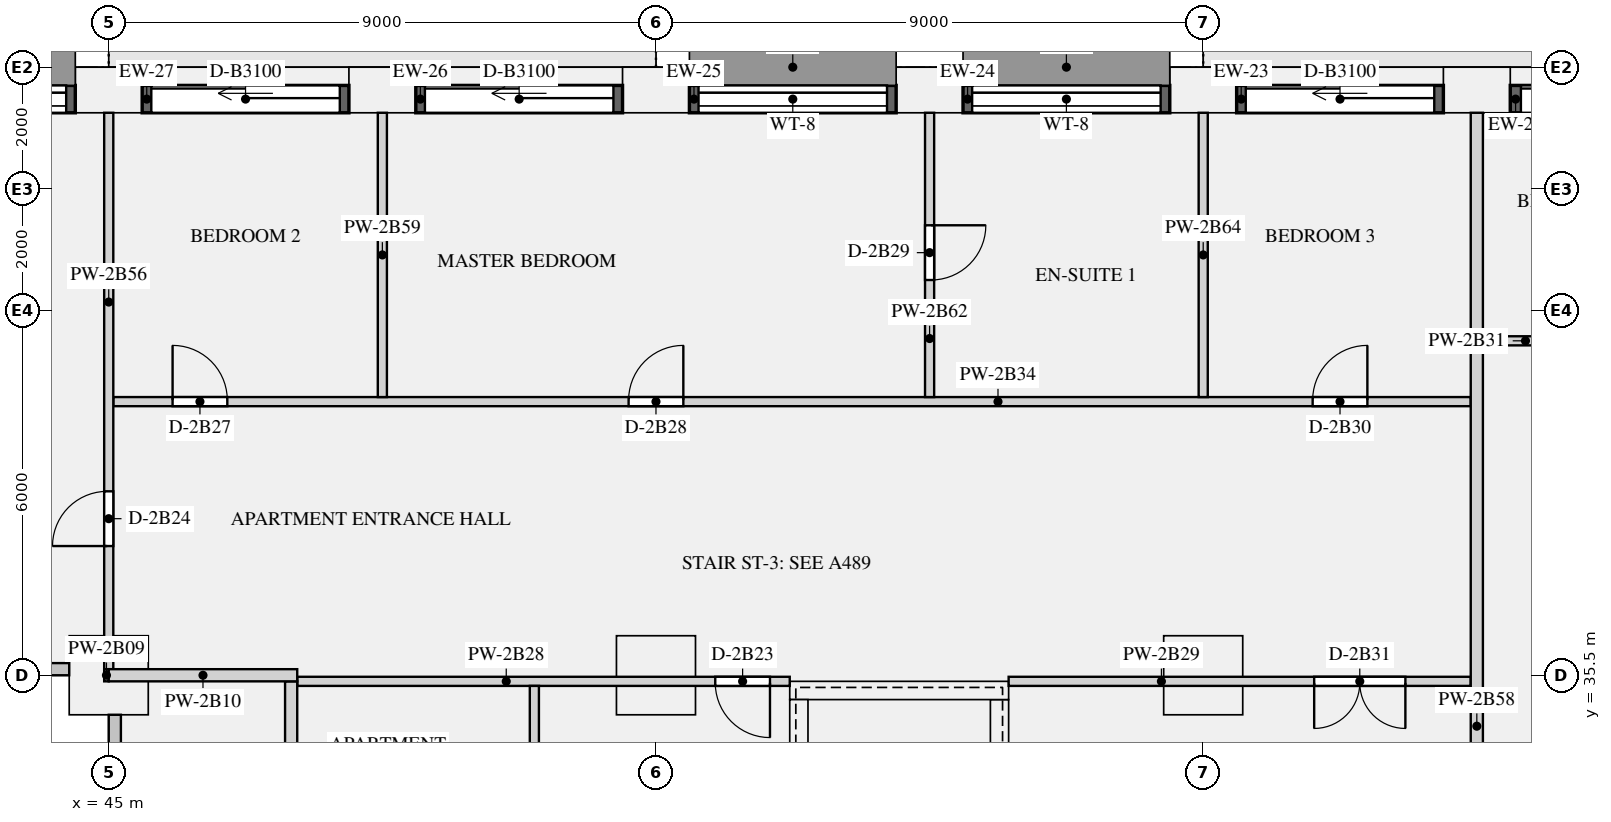
"""IFC4 building model, lengths in metres.
Left out: names, types, materials, properties, quantities, classifications, styles, units other than length and angle.
Written with IfcOpenShell. Run it as: python <this file> out.ifc"""

import sys

from ifc_helpers import new_model, si_unit, direction, frame, frame_2d, origin, origin_2d, place, context, subcontext, project, spatial, rectangle, extrude, element, fill, save


model = new_model("IFC4")
c1 = context("Model", 3, precision=1e-05, world=origin(), true_north=direction((0.0, 1.0)))
c2 = subcontext(c1, "Body", "Model", "MODEL_VIEW")
j1 = project(units=[si_unit("LENGTHUNIT", "METRE"), si_unit("PLANEANGLEUNIT", "RADIAN")], contexts=[c1])
p1 = place(None, origin())
s1 = spatial("IfcSite", under=j1, at=p1, CompositionType="ELEMENT")
p2 = place(p1, origin())
s2 = spatial("IfcBuilding", under=s1, at=p2, CompositionType="ELEMENT")
p3 = place(p2, frame((0.0, 0.0, 93.0)))
s3 = spatial("IfcBuildingStorey", under=s2, at=p3, CompositionType="ELEMENT", Elevation=93.0)
for number, where, z_axis, x_axis in (
    (1, (67.5, 45.125, 0.0), (0.0, 0.0, 1.0), (-1.0, 0.0, 0.0)),
    (2, (63.0, 45.125, 0.0), (0.0, 0.0, 1.0), (-1.0, 0.0, 0.0)),
    (3, (58.5, 45.125, 0.0), (0.0, 0.0, 1.0), (-1.0, 0.0, 0.0)),
    (4, (54.0, 45.125, 0.0), (0.0, 0.0, 1.0), (-1.0, 0.0, 0.0)),
    (5, (49.5, 45.125, 0.0), (0.0, 0.0, 1.0), (-1.0, 0.0, 0.0)),
    (6, (45.0, 45.125, 0.0), (0.0, 0.0, 1.0), (-1.0, 0.0, 0.0)),
):
    element("IfcColumn", number, at=place(p3, frame(where, z_axis=z_axis, x_axis=x_axis)), inside=s3, PredefinedType="USERDEFINED", context=c2, shape_type="SweptSolid", body=[
        extrude(rectangle(XDim=1.1, YDim=0.75, at=origin_2d()), origin(), (0.0, 0.0, 1.0), 3.15),
    ])
for number, where, z_axis, x_axis in (
    (7, (45.0, 35.5, 0.0), (0.0, 0.0, 1.0), (1.0, 0.0, 0.0)),
    (8, (54.0, 35.5, 0.0), (0.0, 0.0, 1.0), (1.0, 0.0, 0.0)),
    (9, (63.0, 35.5, 0.0), (0.0, 0.0, 1.0), (1.0, 0.0, 0.0)),
):
    element("IfcColumn", number, at=place(p3, frame(where, z_axis=z_axis, x_axis=x_axis)), inside=s3, PredefinedType="COLUMN", context=c2, shape_type="SweptSolid", body=[
        extrude(rectangle(XDim=1.3, YDim=1.3, at=origin_2d()), origin(), (0.0, 0.0, 1.0), 3.15),
    ])
p4 = place(p3, frame((56.2, 35.25, 0.0), z_axis=(0.0, 0.0, 1.0), x_axis=(1.0, 0.0, 0.0)))
e10 = element("IfcWall", 10, at=p4, inside=s3, PredefinedType="SHEAR", context=c2, shape_type="SweptSolid", body=[
    extrude(rectangle(XDim=3.6, YDim=0.3, at=frame_2d((1.8, 0.0))), origin(), (0.0, 0.0, 1.0), 3.15),
])
for number, where, z_axis, x_axis in (
    (11, (56.35, 27.3, 0.0), (0.0, 0.0, 1.0), (0.0, 1.0, 0.0)),
    (12, (59.65, 27.3, 0.0), (0.0, 0.0, 1.0), (0.0, 1.0, 0.0)),
):
    element("IfcWall", number, at=place(p3, frame(where, z_axis=z_axis, x_axis=x_axis)), inside=s3, PredefinedType="SHEAR", context=c2, shape_type="SweptSolid", body=[
        extrude(rectangle(XDim=7.8, YDim=0.3, at=frame_2d((3.9, 0.0))), origin(), (0.0, 0.0, 1.0), 3.15),
    ])
p5 = place(p3, frame((70.9, 44.975, 0.0), z_axis=(0.0, 0.0, 1.0), x_axis=(-1.0, 0.0, 0.0)))
e13 = element("IfcWall", 13, at=p5, inside=s3, PredefinedType="SOLIDWALL", context=c2, shape_type="SweptSolid", body=[
    extrude(rectangle(XDim=2.85, YDim=0.45, at=frame_2d((1.425, 0.0))), origin(), (0.0, 0.0, 1.0), 2.83),
])
p6 = place(p5, frame((0.175, 0.0, 0.0)))
e14 = element("IfcOpeningElement", 14, at=p6, cuts=e13, PredefinedType="OPENING", context=c2, shape_type="SweptSolid", body=[
    extrude(rectangle(XDim=2.5, YDim=2.3, at=frame_2d((1.25, 1.15))), frame((0.0, 0.235, 0.0), z_axis=(0.0, -1.0, 0.0), x_axis=(1.0, 0.0, 0.0)), (0.0, 0.0, 1.0), 0.47),
])
p7 = place(p3, frame((66.95, 44.975, 0.0), z_axis=(0.0, 0.0, 1.0), x_axis=(-1.0, 0.0, 0.0)))
e15 = element("IfcWall", 15, at=p7, inside=s3, PredefinedType="SOLIDWALL", context=c2, shape_type="SweptSolid", body=[
    extrude(rectangle(XDim=3.4, YDim=0.45, at=frame_2d((1.7, 0.0))), origin(), (0.0, 0.0, 1.0), 2.83),
])
p8 = place(p7, frame((0.15, 0.0, 0.0)))
e16 = element("IfcOpeningElement", 16, at=p8, cuts=e15, PredefinedType="OPENING", context=c2, shape_type="SweptSolid", body=[
    extrude(rectangle(XDim=3.1, YDim=2.3, at=frame_2d((1.55, 1.15))), frame((0.0, 0.235, 0.0), z_axis=(0.0, -1.0, 0.0), x_axis=(1.0, 0.0, 0.0)), (0.0, 0.0, 1.0), 0.47),
])
p9 = place(p3, frame((62.45, 44.975, 0.9), z_axis=(0.0, 0.0, 1.0), x_axis=(-1.0, 0.0, 0.0)))
e17 = element("IfcWall", 17, at=p9, inside=s3, PredefinedType="SOLIDWALL", context=c2, shape_type="SweptSolid", body=[
    extrude(rectangle(XDim=3.4, YDim=0.45, at=frame_2d((1.7, 0.0))), origin(), (0.0, 0.0, 1.0), 1.93),
])
p10 = place(p9, frame((0.15, 0.0, 0.15)))
e18 = element("IfcOpeningElement", 18, at=p10, cuts=e17, PredefinedType="OPENING", context=c2, shape_type="SweptSolid", body=[
    extrude(rectangle(XDim=3.1, YDim=1.5, at=frame_2d((1.55, 0.75))), frame((0.0, 0.235, 0.0), z_axis=(0.0, -1.0, 0.0), x_axis=(1.0, 0.0, 0.0)), (0.0, 0.0, 1.0), 0.47),
])
p11 = place(p3, frame((57.95, 44.975, 0.9), z_axis=(0.0, 0.0, 1.0), x_axis=(-1.0, 0.0, 0.0)))
e19 = element("IfcWall", 19, at=p11, inside=s3, PredefinedType="SOLIDWALL", context=c2, shape_type="SweptSolid", body=[
    extrude(rectangle(XDim=3.4, YDim=0.45, at=frame_2d((1.7, 0.0))), origin(), (0.0, 0.0, 1.0), 1.93),
])
p12 = place(p11, frame((0.15, 0.0, 0.15)))
e20 = element("IfcOpeningElement", 20, at=p12, cuts=e19, PredefinedType="OPENING", context=c2, shape_type="SweptSolid", body=[
    extrude(rectangle(XDim=3.1, YDim=1.5, at=frame_2d((1.55, 0.75))), frame((0.0, 0.235, 0.0), z_axis=(0.0, -1.0, 0.0), x_axis=(1.0, 0.0, 0.0)), (0.0, 0.0, 1.0), 0.47),
])
p13 = place(p3, frame((53.45, 44.975, 0.0), z_axis=(0.0, 0.0, 1.0), x_axis=(-1.0, 0.0, 0.0)))
e21 = element("IfcWall", 21, at=p13, inside=s3, PredefinedType="SOLIDWALL", context=c2, shape_type="SweptSolid", body=[
    extrude(rectangle(XDim=3.4, YDim=0.45, at=frame_2d((1.7, 0.0))), origin(), (0.0, 0.0, 1.0), 2.83),
])
p14 = place(p13, frame((0.15, 0.0, 0.0)))
e22 = element("IfcOpeningElement", 22, at=p14, cuts=e21, PredefinedType="OPENING", context=c2, shape_type="SweptSolid", body=[
    extrude(rectangle(XDim=3.1, YDim=2.3, at=frame_2d((1.55, 1.15))), frame((0.0, 0.235, 0.0), z_axis=(0.0, -1.0, 0.0), x_axis=(1.0, 0.0, 0.0)), (0.0, 0.0, 1.0), 0.47),
])
p15 = place(p3, frame((48.95, 44.975, 0.0), z_axis=(0.0, 0.0, 1.0), x_axis=(-1.0, 0.0, 0.0)))
e23 = element("IfcWall", 23, at=p15, inside=s3, PredefinedType="SOLIDWALL", context=c2, shape_type="SweptSolid", body=[
    extrude(rectangle(XDim=3.4, YDim=0.45, at=frame_2d((1.7, 0.0))), origin(), (0.0, 0.0, 1.0), 2.83),
])
p16 = place(p15, frame((0.15, 0.0, 0.0)))
e24 = element("IfcOpeningElement", 24, at=p16, cuts=e23, PredefinedType="OPENING", context=c2, shape_type="SweptSolid", body=[
    extrude(rectangle(XDim=3.1, YDim=2.3, at=frame_2d((1.55, 1.15))), frame((0.0, 0.235, 0.0), z_axis=(0.0, -1.0, 0.0), x_axis=(1.0, 0.0, 0.0)), (0.0, 0.0, 1.0), 0.47),
])
p17 = place(p3, frame((44.45, 44.975, 0.9), z_axis=(0.0, 0.0, 1.0), x_axis=(-1.0, 0.0, 0.0)))
e25 = element("IfcWall", 25, at=p17, inside=s3, PredefinedType="SOLIDWALL", context=c2, shape_type="SweptSolid", body=[
    extrude(rectangle(XDim=3.4, YDim=0.45, at=frame_2d((1.7, 0.0))), origin(), (0.0, 0.0, 1.0), 1.93),
])
p18 = place(p17, frame((0.15, 0.0, 0.15)))
e26 = element("IfcOpeningElement", 26, at=p18, cuts=e25, PredefinedType="OPENING", context=c2, shape_type="SweptSolid", body=[
    extrude(rectangle(XDim=3.1, YDim=1.5, at=frame_2d((1.55, 0.75))), frame((0.0, 0.235, 0.0), z_axis=(0.0, -1.0, 0.0), x_axis=(1.0, 0.0, 0.0)), (0.0, 0.0, 1.0), 0.47),
])
p19 = place(p3, frame((44.925, 35.5, 0.0), z_axis=(0.0, 0.0, 1.0), x_axis=(1.0, 0.0, 0.0)))
e27 = element("IfcWall", 27, at=p19, inside=s3, PredefinedType="PARTITIONING", context=c2, shape_type="SweptSolid", body=[
    extrude(rectangle(XDim=0.075, YDim=0.2, at=frame_2d((0.038, 0.0))), origin(), (0.0, 0.0, 1.0), 2.83),
])
p20 = place(p3, frame((45.0, 35.5, 0.0), z_axis=(0.0, 0.0, 1.0), x_axis=(1.0, 0.0, 0.0)))
e28 = element("IfcWall", 28, at=p20, inside=s3, PredefinedType="PARTITIONING", context=c2, shape_type="SweptSolid", body=[
    extrude(rectangle(XDim=3.1, YDim=0.2, at=frame_2d((1.55, 0.0))), origin(), (0.0, 0.0, 1.0), 2.83),
])
p21 = place(p3, frame((48.1, 35.4, 0.0), z_axis=(0.0, 0.0, 1.0), x_axis=(1.0, 0.0, 0.0)))
e29 = element("IfcWall", 29, at=p21, inside=s3, PredefinedType="PARTITIONING", context=c2, shape_type="SweptSolid", body=[
    extrude(rectangle(XDim=8.1, YDim=0.15, at=frame_2d((4.05, 0.0))), origin(), (0.0, 0.0, 1.0), 2.83),
])
p22 = place(p21, frame((6.875, 0.0, 0.0)))
e30 = element("IfcOpeningElement", 30, at=p22, cuts=e29, PredefinedType="OPENING", context=c2, shape_type="SweptSolid", body=[
    extrude(rectangle(XDim=0.9, YDim=2.1, at=frame_2d((0.45, 1.05))), frame((0.0, 0.085, 0.0), z_axis=(0.0, -1.0, 0.0), x_axis=(1.0, 0.0, 0.0)), (0.0, 0.0, 1.0), 0.17),
])
p23 = place(p3, frame((59.8, 35.4, 0.0), z_axis=(0.0, 0.0, 1.0), x_axis=(1.0, 0.0, 0.0)))
e31 = element("IfcWall", 31, at=p23, inside=s3, PredefinedType="PARTITIONING", context=c2, shape_type="SweptSolid", body=[
    extrude(rectangle(XDim=7.6, YDim=0.15, at=frame_2d((3.8, 0.0))), origin(), (0.0, 0.0, 1.0), 2.83),
])
p24 = place(p23, frame((5.025, 0.0, 0.0)))
e32 = element("IfcOpeningElement", 32, at=p24, cuts=e31, PredefinedType="OPENING", context=c2, shape_type="SweptSolid", body=[
    extrude(rectangle(XDim=1.5, YDim=2.1, at=frame_2d((0.75, 1.05))), frame((0.0, 0.085, 0.0), z_axis=(0.0, -1.0, 0.0), x_axis=(1.0, 0.0, 0.0)), (0.0, 0.0, 1.0), 0.17),
])
p25 = place(p3, frame((67.6, 41.0, 0.0), z_axis=(0.0, 0.0, 1.0), x_axis=(1.0, 0.0, 0.0)))
e33 = element("IfcWall", 33, at=p25, inside=s3, PredefinedType="PARTITIONING", context=c2, shape_type="SweptSolid", body=[
    extrude(rectangle(XDim=3.65, YDim=0.15, at=frame_2d((1.825, 0.0))), origin(), (0.0, 0.0, 1.0), 2.83),
])
p26 = place(p25, frame((1.4, 0.0, 0.0)))
e34 = element("IfcOpeningElement", 34, at=p26, cuts=e33, PredefinedType="OPENING", context=c2, shape_type="SweptSolid", body=[
    extrude(rectangle(XDim=0.9, YDim=2.1, at=frame_2d((0.45, 1.05))), frame((0.0, 0.085, 0.0), z_axis=(0.0, -1.0, 0.0), x_axis=(1.0, 0.0, 0.0)), (0.0, 0.0, 1.0), 0.17),
])
p27 = place(p3, frame((45.075, 40.0, 0.0), z_axis=(0.0, 0.0, 1.0), x_axis=(1.0, 0.0, 0.0)))
e35 = element("IfcWall", 35, at=p27, inside=s3, PredefinedType="PARTITIONING", context=c2, shape_type="SweptSolid", body=[
    extrude(rectangle(XDim=22.325, YDim=0.15, at=frame_2d((11.163, 0.0))), origin(), (0.0, 0.0, 1.0), 2.83),
])
p28 = place(p27, frame((0.975, 0.0, 0.0)))
e36 = element("IfcOpeningElement", 36, at=p28, cuts=e35, PredefinedType="OPENING", context=c2, shape_type="SweptSolid", body=[
    extrude(rectangle(XDim=0.9, YDim=2.1, at=frame_2d((0.45, 1.05))), frame((0.0, 0.085, 0.0), z_axis=(0.0, -1.0, 0.0), x_axis=(1.0, 0.0, 0.0)), (0.0, 0.0, 1.0), 0.17),
])
p29 = place(p27, frame((8.475, 0.0, 0.0)))
e37 = element("IfcOpeningElement", 37, at=p29, cuts=e35, PredefinedType="OPENING", context=c2, shape_type="SweptSolid", body=[
    extrude(rectangle(XDim=0.9, YDim=2.1, at=frame_2d((0.45, 1.05))), frame((0.0, 0.085, 0.0), z_axis=(0.0, -1.0, 0.0), x_axis=(1.0, 0.0, 0.0)), (0.0, 0.0, 1.0), 0.17),
])
p30 = place(p27, frame((19.725, 0.0, 0.0)))
e38 = element("IfcOpeningElement", 38, at=p30, cuts=e35, PredefinedType="OPENING", context=c2, shape_type="SweptSolid", body=[
    extrude(rectangle(XDim=0.9, YDim=2.1, at=frame_2d((0.45, 1.05))), frame((0.0, 0.085, 0.0), z_axis=(0.0, -1.0, 0.0), x_axis=(1.0, 0.0, 0.0)), (0.0, 0.0, 1.0), 0.17),
])
p31 = place(p3, frame((48.0, 27.1, 0.0), z_axis=(0.0, 0.0, 1.0), x_axis=(0.0, 1.0, 0.0)))
e39 = element("IfcWall", 39, at=p31, inside=s3, PredefinedType="PARTITIONING", context=c2, shape_type="SweptSolid", body=[
    extrude(rectangle(XDim=8.3, YDim=0.2, at=frame_2d((4.15, 0.0))), origin(), (0.0, 0.0, 1.0), 2.83),
])
p32 = place(p3, frame((52.0, 27.1, 0.0), z_axis=(0.0, 0.0, 1.0), x_axis=(0.0, 1.0, 0.0)))
e40 = element("IfcWall", 40, at=p32, inside=s3, PredefinedType="PARTITIONING", context=c2, shape_type="SweptSolid", body=[
    extrude(rectangle(XDim=8.225, YDim=0.15, at=frame_2d((4.112, 0.0))), origin(), (0.0, 0.0, 1.0), 2.83),
])
p33 = place(p32, frame((1.2, 0.0, 0.0)))
e41 = element("IfcOpeningElement", 41, at=p33, cuts=e40, PredefinedType="OPENING", context=c2, shape_type="SweptSolid", body=[
    extrude(rectangle(XDim=0.9, YDim=2.1, at=frame_2d((0.45, 1.05))), frame((0.0, 0.085, 0.0), z_axis=(0.0, -1.0, 0.0), x_axis=(1.0, 0.0, 0.0)), (0.0, 0.0, 1.0), 0.17),
])
p34 = place(p32, frame((5.4, 0.0, 0.0)))
e42 = element("IfcOpeningElement", 42, at=p34, cuts=e40, PredefinedType="OPENING", context=c2, shape_type="SweptSolid", body=[
    extrude(rectangle(XDim=0.9, YDim=2.1, at=frame_2d((0.45, 1.05))), frame((0.0, 0.085, 0.0), z_axis=(0.0, -1.0, 0.0), x_axis=(1.0, 0.0, 0.0)), (0.0, 0.0, 1.0), 0.17),
])
p35 = place(p3, frame((45.0, 35.6, 0.0), z_axis=(0.0, 0.0, 1.0), x_axis=(0.0, 1.0, 0.0)))
e43 = element("IfcWall", 43, at=p35, inside=s3, PredefinedType="PARTITIONING", context=c2, shape_type="SweptSolid", body=[
    extrude(rectangle(XDim=9.15, YDim=0.15, at=frame_2d((4.575, 0.0))), origin(), (0.0, 0.0, 1.0), 2.83),
])
p36 = place(p35, frame((2.025, 0.0, 0.0)))
e44 = element("IfcOpeningElement", 44, at=p36, cuts=e43, PredefinedType="OPENING", context=c2, shape_type="SweptSolid", body=[
    extrude(rectangle(XDim=0.9, YDim=2.1, at=frame_2d((0.45, 1.05))), frame((0.0, 0.085, 0.0), z_axis=(0.0, -1.0, 0.0), x_axis=(1.0, 0.0, 0.0)), (0.0, 0.0, 1.0), 0.17),
])
p37 = place(p3, frame((67.5, 24.575, 0.0), z_axis=(0.0, 0.0, 1.0), x_axis=(0.0, 1.0, 0.0)))
e45 = element("IfcWall", 45, at=p37, inside=s3, PredefinedType="PARTITIONING", context=c2, shape_type="SweptSolid", body=[
    extrude(rectangle(XDim=20.175, YDim=0.2, at=frame_2d((10.087, 0.0))), origin(), (0.0, 0.0, 1.0), 2.83),
])
p38 = place(p3, frame((49.5, 40.075, 0.0), z_axis=(0.0, 0.0, 1.0), x_axis=(0.0, 1.0, 0.0)))
e46 = element("IfcWall", 46, at=p38, inside=s3, PredefinedType="PARTITIONING", context=c2, shape_type="SweptSolid", body=[
    extrude(rectangle(XDim=4.675, YDim=0.15, at=frame_2d((2.337, 0.0))), origin(), (0.0, 0.0, 1.0), 2.83),
])
p39 = place(p3, frame((58.5, 40.075, 0.0), z_axis=(0.0, 0.0, 1.0), x_axis=(0.0, 1.0, 0.0)))
e47 = element("IfcWall", 47, at=p39, inside=s3, PredefinedType="PARTITIONING", context=c2, shape_type="SweptSolid", body=[
    extrude(rectangle(XDim=4.675, YDim=0.15, at=frame_2d((2.337, 0.0))), origin(), (0.0, 0.0, 1.0), 2.83),
])
p40 = place(p39, frame((1.925, 0.0, 0.0)))
e48 = element("IfcOpeningElement", 48, at=p40, cuts=e47, PredefinedType="OPENING", context=c2, shape_type="SweptSolid", body=[
    extrude(rectangle(XDim=0.9, YDim=2.1, at=frame_2d((0.45, 1.05))), frame((0.0, 0.085, 0.0), z_axis=(0.0, -1.0, 0.0), x_axis=(1.0, 0.0, 0.0)), (0.0, 0.0, 1.0), 0.17),
])
p41 = place(p3, frame((63.0, 40.075, 0.0), z_axis=(0.0, 0.0, 1.0), x_axis=(0.0, 1.0, 0.0)))
e49 = element("IfcWall", 49, at=p41, inside=s3, PredefinedType="PARTITIONING", context=c2, shape_type="SweptSolid", body=[
    extrude(rectangle(XDim=4.675, YDim=0.15, at=frame_2d((2.337, 0.0))), origin(), (0.0, 0.0, 1.0), 2.83),
])
p42 = place(p6, origin())
e50 = element("IfcDoor", 50, at=p42, inside=s3, OperationType="SLIDING_TO_LEFT", PredefinedType="DOOR", context=c2, shape_type="SweptSolid", body=[
    extrude(rectangle(XDim=2.5, YDim=2.3, at=frame_2d((1.25, 1.15))), frame((0.0, -0.07, 0.0), z_axis=(0.0, -1.0, 0.0), x_axis=(1.0, 0.0, 0.0)), (0.0, 0.0, 1.0), 0.05),
])
fill(e14, e50)
p43 = place(p8, origin())
e51 = element("IfcDoor", 51, at=p43, inside=s3, OperationType="SLIDING_TO_LEFT", PredefinedType="DOOR", context=c2, shape_type="SweptSolid", body=[
    extrude(rectangle(XDim=3.1, YDim=2.3, at=frame_2d((1.55, 1.15))), frame((0.0, -0.07, 0.0), z_axis=(0.0, -1.0, 0.0), x_axis=(1.0, 0.0, 0.0)), (0.0, 0.0, 1.0), 0.05),
])
fill(e16, e51)
p44 = place(p10, origin())
e52 = element("IfcWindow", 52, at=p44, inside=s3, PartitioningType="SINGLE_PANEL", PredefinedType="WINDOW", context=c2, shape_type="SweptSolid", body=[
    extrude(rectangle(XDim=3.1, YDim=1.5, at=frame_2d((1.55, 0.75))), frame((0.0, -0.065, 0.0), z_axis=(0.0, -1.0, 0.0), x_axis=(1.0, 0.0, 0.0)), (0.0, 0.0, 1.0), 0.06),
])
fill(e18, e52)
p45 = place(p12, origin())
e53 = element("IfcWindow", 53, at=p45, inside=s3, PartitioningType="SINGLE_PANEL", PredefinedType="WINDOW", context=c2, shape_type="SweptSolid", body=[
    extrude(rectangle(XDim=3.1, YDim=1.5, at=frame_2d((1.55, 0.75))), frame((0.0, -0.065, 0.0), z_axis=(0.0, -1.0, 0.0), x_axis=(1.0, 0.0, 0.0)), (0.0, 0.0, 1.0), 0.06),
])
fill(e20, e53)
p46 = place(p14, origin())
e54 = element("IfcDoor", 54, at=p46, inside=s3, OperationType="SLIDING_TO_LEFT", PredefinedType="DOOR", context=c2, shape_type="SweptSolid", body=[
    extrude(rectangle(XDim=3.1, YDim=2.3, at=frame_2d((1.55, 1.15))), frame((0.0, -0.07, 0.0), z_axis=(0.0, -1.0, 0.0), x_axis=(1.0, 0.0, 0.0)), (0.0, 0.0, 1.0), 0.05),
])
fill(e22, e54)
p47 = place(p16, origin())
e55 = element("IfcDoor", 55, at=p47, inside=s3, OperationType="SLIDING_TO_LEFT", PredefinedType="DOOR", context=c2, shape_type="SweptSolid", body=[
    extrude(rectangle(XDim=3.1, YDim=2.3, at=frame_2d((1.55, 1.15))), frame((0.0, -0.07, 0.0), z_axis=(0.0, -1.0, 0.0), x_axis=(1.0, 0.0, 0.0)), (0.0, 0.0, 1.0), 0.05),
])
fill(e24, e55)
p48 = place(p18, origin())
e56 = element("IfcWindow", 56, at=p48, inside=s3, PartitioningType="SINGLE_PANEL", PredefinedType="WINDOW", context=c2, shape_type="SweptSolid", body=[
    extrude(rectangle(XDim=3.1, YDim=1.5, at=frame_2d((1.55, 0.75))), frame((0.0, -0.065, 0.0), z_axis=(0.0, -1.0, 0.0), x_axis=(1.0, 0.0, 0.0)), (0.0, 0.0, 1.0), 0.06),
])
fill(e26, e56)
p49 = place(p22, frame((0.9, 0.0, 0.0), z_axis=(0.0, 0.0, 1.0), x_axis=(-1.0, 0.0, 0.0)))
e57 = element("IfcDoor", 57, at=p49, inside=s3, OperationType="SINGLE_SWING_LEFT", PredefinedType="DOOR", context=c2, shape_type="SweptSolid", body=[
    extrude(rectangle(XDim=0.9, YDim=2.1, at=frame_2d((0.45, 1.05))), frame((0.0, 0.025, 0.0), z_axis=(0.0, -1.0, 0.0), x_axis=(1.0, 0.0, 0.0)), (0.0, 0.0, 1.0), 0.05),
])
fill(e30, e57)
p50 = place(p36, origin())
e58 = element("IfcDoor", 58, at=p50, inside=s3, OperationType="SINGLE_SWING_LEFT", PredefinedType="DOOR", context=c2, shape_type="SweptSolid", body=[
    extrude(rectangle(XDim=0.9, YDim=2.1, at=frame_2d((0.45, 1.05))), frame((0.0, 0.025, 0.0), z_axis=(0.0, -1.0, 0.0), x_axis=(1.0, 0.0, 0.0)), (0.0, 0.0, 1.0), 0.05),
])
fill(e44, e58)
p51 = place(p28, origin())
e59 = element("IfcDoor", 59, at=p51, inside=s3, OperationType="SINGLE_SWING_LEFT", PredefinedType="DOOR", context=c2, shape_type="SweptSolid", body=[
    extrude(rectangle(XDim=0.9, YDim=2.1, at=frame_2d((0.45, 1.05))), frame((0.0, 0.025, 0.0), z_axis=(0.0, -1.0, 0.0), x_axis=(1.0, 0.0, 0.0)), (0.0, 0.0, 1.0), 0.05),
])
fill(e36, e59)
p52 = place(p29, origin())
e60 = element("IfcDoor", 60, at=p52, inside=s3, OperationType="SINGLE_SWING_RIGHT", PredefinedType="DOOR", context=c2, shape_type="SweptSolid", body=[
    extrude(rectangle(XDim=0.9, YDim=2.1, at=frame_2d((0.45, 1.05))), frame((0.0, 0.025, 0.0), z_axis=(0.0, -1.0, 0.0), x_axis=(1.0, 0.0, 0.0)), (0.0, 0.0, 1.0), 0.05),
])
fill(e37, e60)
p53 = place(p40, frame((0.9, 0.0, 0.0), z_axis=(0.0, 0.0, 1.0), x_axis=(-1.0, 0.0, 0.0)))
e61 = element("IfcDoor", 61, at=p53, inside=s3, OperationType="SINGLE_SWING_LEFT", PredefinedType="DOOR", context=c2, shape_type="SweptSolid", body=[
    extrude(rectangle(XDim=0.9, YDim=2.1, at=frame_2d((0.45, 1.05))), frame((0.0, 0.025, 0.0), z_axis=(0.0, -1.0, 0.0), x_axis=(1.0, 0.0, 0.0)), (0.0, 0.0, 1.0), 0.05),
])
fill(e48, e61)
p54 = place(p30, origin())
e62 = element("IfcDoor", 62, at=p54, inside=s3, OperationType="SINGLE_SWING_RIGHT", PredefinedType="DOOR", context=c2, shape_type="SweptSolid", body=[
    extrude(rectangle(XDim=0.9, YDim=2.1, at=frame_2d((0.45, 1.05))), frame((0.0, 0.025, 0.0), z_axis=(0.0, -1.0, 0.0), x_axis=(1.0, 0.0, 0.0)), (0.0, 0.0, 1.0), 0.05),
])
fill(e38, e62)
p55 = place(p24, frame((1.5, 0.0, 0.0), z_axis=(0.0, 0.0, 1.0), x_axis=(-1.0, 0.0, 0.0)))
e63 = element("IfcDoor", 63, at=p55, inside=s3, OperationType="DOUBLE_DOOR_SINGLE_SWING", PredefinedType="DOOR", context=c2, shape_type="SweptSolid", body=[
    extrude(rectangle(XDim=1.5, YDim=2.1, at=frame_2d((0.75, 1.05))), frame((0.0, 0.025, 0.0), z_axis=(0.0, -1.0, 0.0), x_axis=(1.0, 0.0, 0.0)), (0.0, 0.0, 1.0), 0.05),
])
fill(e32, e63)
save(model, sys.argv[1])
